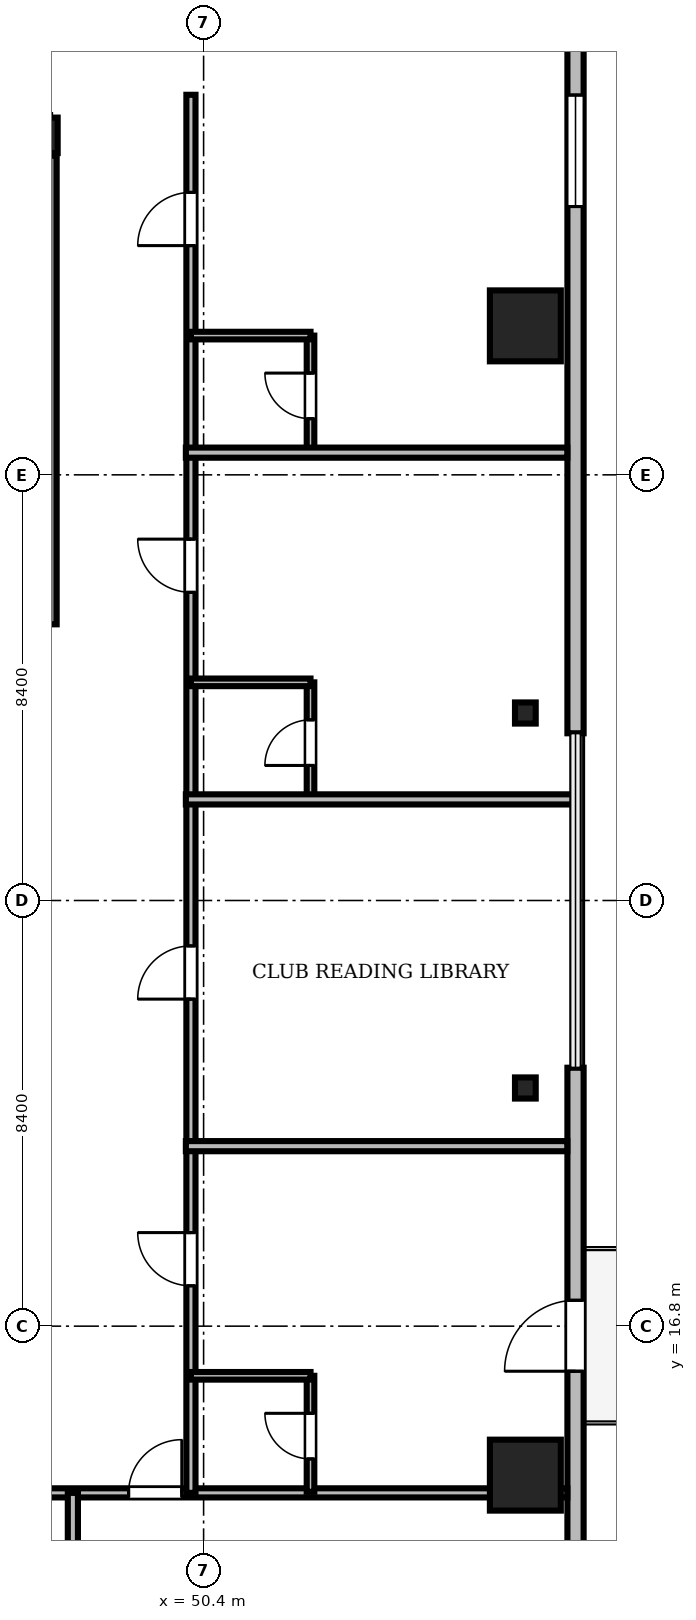
"""IFC4 building model, lengths in metres.
Left out: names, types, materials, properties, quantities, classifications, styles, units other than length and angle.
Written with IfcOpenShell. Run it as: python <this file> out.ifc"""

import sys

from ifc_helpers import new_model, si_unit, direction, frame, frame_2d, origin, origin_2d, place, context, subcontext, project, spatial, rectangle, i_section, extrude, source, transform, mapped, element, fill, save


model = new_model("IFC4")
c1 = context("Model", 3, precision=1e-05, world=origin(), true_north=direction((0.0, 1.0)))
c2 = subcontext(c1, "Body", "Model", "MODEL_VIEW")
j1 = project(units=[si_unit("LENGTHUNIT", "METRE"), si_unit("PLANEANGLEUNIT", "RADIAN")], contexts=[c1])
p1 = place(None, origin())
s1 = spatial("IfcSite", under=j1, at=p1, CompositionType="ELEMENT")
p2 = place(p1, origin())
s2 = spatial("IfcBuilding", under=s1, at=p2, CompositionType="ELEMENT")
p3 = place(p2, frame((0.0, 0.0, 177.2)))
s3 = spatial("IfcBuildingStorey", under=s2, at=p3, CompositionType="ELEMENT", Elevation=177.2)
m1 = source(origin(), c2, "Body", "SweptSolid", [
    extrude(i_section(OverallWidth=0.3, OverallDepth=0.7, WebThickness=0.017, FlangeThickness=0.032, FilletRadius=0.027, at=origin_2d()), origin(), (0.0, 0.0, 1.0), 3.58),
])
p4 = place(p3, frame((47.37, 40.3, 0.0), z_axis=(0.0, 0.0, 1.0), x_axis=(1.0, 0.0, 0.0)))
e1 = element("IfcColumn", 1, at=p4, inside=s3, PredefinedType="COLUMN", context=c2, shape_type="MappedRepresentation", body=[
    mapped(m1, transform((0.0, 0.0, 0.0), scale=1.0)),
])
m2 = source(origin(), c2, "Body", "SweptSolid", [
    extrude(rectangle(XDim=1.4, YDim=1.4, at=origin_2d()), origin(), (0.0, 0.0, 1.0), 3.58),
])
for number, where, z_axis, x_axis in (
    (2, (56.75, 13.86, 0.0), (0.0, 0.0, 1.0), (1.0, 0.0, 0.0)),
    (3, (56.75, 36.54, 0.0), (0.0, 0.0, 1.0), (1.0, 0.0, 0.0)),
):
    element("IfcColumn", number, at=place(p3, frame(where, z_axis=z_axis, x_axis=x_axis)), inside=s3, PredefinedType="COLUMN", context=c2, shape_type="MappedRepresentation", body=[
        mapped(m2, transform((0.0, 0.0, 0.0), scale=1.0)),
    ])
m3 = source(origin(), c2, "Body", "SweptSolid", [
    extrude(i_section(OverallWidth=0.409, OverallDepth=0.417, WebThickness=0.021, FlangeThickness=0.033, FilletRadius=0.015, at=origin_2d()), origin(), (0.0, 0.0, 1.0), 3.58),
])
for number, where, z_axis, x_axis in (
    (4, (56.75, 21.5, 0.0), (0.0, 0.0, 1.0), (1.0, 0.0, 0.0)),
    (5, (56.75, 28.9, 0.0), (0.0, 0.0, 1.0), (1.0, 0.0, 0.0)),
):
    element("IfcColumn", number, at=place(p3, frame(where, z_axis=z_axis, x_axis=x_axis)), inside=s3, PredefinedType="COLUMN", context=c2, shape_type="MappedRepresentation", body=[
        mapped(m3, transform((0.0, 0.0, 0.0), scale=1.0)),
    ])
m4 = source(origin(), c2, "Body", "SweptSolid", [
    extrude(rectangle(XDim=15.6, YDim=0.32, at=frame_2d((7.8, 0.0))), origin(), (0.0, 0.0, 1.0), 3.58),
])
p5 = place(p3, frame((57.74, 6.3, 0.0), z_axis=(0.0, 0.0, 1.0), x_axis=(0.0, 1.0, 0.0)))
e6 = element("IfcWall", 6, at=p5, inside=s3, PredefinedType="SOLIDWALL", context=c2, shape_type="MappedRepresentation", body=[
    mapped(m4, transform((0.0, 0.0, 0.0), scale=1.0)),
])
m5 = source(origin(), c2, "Body", "SweptSolid", [
    extrude(rectangle(XDim=1.4, YDim=2.3, at=frame_2d((0.7, 1.15))), frame((0.0, 0.17, 0.0), z_axis=(0.0, -1.0, 0.0), x_axis=(1.0, 0.0, 0.0)), (0.0, 0.0, 1.0), 0.34),
])
p6 = place(p5, frame((9.61, 0.0, 0.0)))
e7 = element("IfcOpeningElement", 7, at=p6, cuts=e6, PredefinedType="OPENING", context=c2, shape_type="MappedRepresentation", body=[
    mapped(m5, transform((0.0, 0.0, 0.0), scale=1.0)),
])
m6 = source(origin(), c2, "Body", "SweptSolid", [
    extrude(rectangle(XDim=2.2, YDim=2.4, at=frame_2d((1.1, 1.2))), frame((0.0, 0.17, 0.0), z_axis=(0.0, -1.0, 0.0), x_axis=(1.0, 0.0, 0.0)), (0.0, 0.0, 1.0), 0.34),
])
p7 = place(p5, frame((3.005, 0.0, 0.72)))
e8 = element("IfcOpeningElement", 8, at=p7, cuts=e6, PredefinedType="OPENING", context=c2, shape_type="MappedRepresentation", body=[
    mapped(m6, transform((0.0, 0.0, 0.0), scale=1.0)),
])
m7 = source(origin(), c2, "Body", "SweptSolid", [
    extrude(rectangle(XDim=15.6, YDim=0.32, at=frame_2d((7.8, 0.0))), origin(), (0.0, 0.0, 1.0), 3.58),
])
p8 = place(p3, frame((57.74, 28.5, 0.0), z_axis=(0.0, 0.0, 1.0), x_axis=(0.0, 1.0, 0.0)))
e9 = element("IfcWall", 9, at=p8, inside=s3, PredefinedType="SOLIDWALL", context=c2, shape_type="MappedRepresentation", body=[
    mapped(m7, transform((0.0, 0.0, 0.0), scale=1.0)),
])
p9 = place(p8, frame((10.395, 0.0, 0.72)))
e10 = element("IfcOpeningElement", 10, at=p9, cuts=e9, PredefinedType="OPENING", context=c2, shape_type="MappedRepresentation", body=[
    mapped(m6, transform((0.0, 0.0, 0.0), scale=1.0)),
])
m8 = source(origin(), c2, "Body", "SweptSolid", [
    extrude(rectangle(XDim=9.25, YDim=0.25, at=frame_2d((4.625, 0.0))), origin(), (0.0, 0.0, 1.0), 3.6),
])
p10 = place(p3, frame((47.375, 30.65, 0.0), z_axis=(0.0, 0.0, 1.0), x_axis=(0.0, 1.0, 0.0)))
e11 = element("IfcWall", 11, at=p10, inside=s3, PredefinedType="SOLIDWALL", context=c2, shape_type="MappedRepresentation", body=[
    mapped(m8, transform((0.0, 0.0, 0.0), scale=1.0)),
])
m9 = source(origin(), c2, "Body", "SweptSolid", [
    extrude(rectangle(XDim=46.156, YDim=0.18, at=frame_2d((23.078, 0.0))), origin(), (0.0, 0.0, 1.0), 2.822),
])
p11 = place(p3, frame((11.422, 13.51, 0.0), z_axis=(0.0, 0.0, 1.0), x_axis=(1.0, 0.0, 0.0)))
e12 = element("IfcWall", 12, at=p11, inside=s3, PredefinedType="PARTITIONING", context=c2, shape_type="MappedRepresentation", body=[
    mapped(m9, transform((0.0, 0.0, 0.0), scale=1.0)),
])
m10 = source(origin(), c2, "Body", "SweptSolid", [
    extrude(rectangle(XDim=1.05, YDim=2.2, at=frame_2d((0.525, 1.1))), frame((0.0, 0.1, 0.0), z_axis=(0.0, -1.0, 0.0), x_axis=(1.0, 0.0, 0.0)), (0.0, 0.0, 1.0), 0.2),
])
p12 = place(p11, frame((9.758, 0.0, 0.0)))
e13 = element("IfcOpeningElement", 13, at=p12, cuts=e12, PredefinedType="OPENING", context=c2, shape_type="MappedRepresentation", body=[
    mapped(m10, transform((0.0, 0.0, 0.0), scale=1.0)),
])
p13 = place(p11, frame((12.878, 0.0, 0.0)))
e14 = element("IfcOpeningElement", 14, at=p13, cuts=e12, PredefinedType="OPENING", context=c2, shape_type="MappedRepresentation", body=[
    mapped(m10, transform((0.0, 0.0, 0.0), scale=1.0)),
])
p14 = place(p11, frame((16.893, 0.0, 0.0)))
e15 = element("IfcOpeningElement", 15, at=p14, cuts=e12, PredefinedType="OPENING", context=c2, shape_type="MappedRepresentation", body=[
    mapped(m10, transform((0.0, 0.0, 0.0), scale=1.0)),
])
p15 = place(p11, frame((20.344, 0.0, 0.0)))
e16 = element("IfcOpeningElement", 16, at=p15, cuts=e12, PredefinedType="OPENING", context=c2, shape_type="MappedRepresentation", body=[
    mapped(m10, transform((0.0, 0.0, 0.0), scale=1.0)),
])
p16 = place(p11, frame((24.008, 0.0, 0.0)))
e17 = element("IfcOpeningElement", 17, at=p16, cuts=e12, PredefinedType="OPENING", context=c2, shape_type="MappedRepresentation", body=[
    mapped(m10, transform((0.0, 0.0, 0.0), scale=1.0)),
])
p17 = place(p11, frame((28.055, 0.0, 0.0)))
e18 = element("IfcOpeningElement", 18, at=p17, cuts=e12, PredefinedType="OPENING", context=c2, shape_type="MappedRepresentation", body=[
    mapped(m10, transform((0.0, 0.0, 0.0), scale=1.0)),
])
m11 = source(origin(), c2, "Body", "SweptSolid", [
    extrude(rectangle(XDim=0.95, YDim=2.15, at=frame_2d((0.475, 1.075))), frame((0.0, 0.1, 0.0), z_axis=(0.0, -1.0, 0.0), x_axis=(1.0, 0.0, 0.0)), (0.0, 0.0, 1.0), 0.2),
])
p18 = place(p11, frame((34.246, 0.0, 0.0)))
e19 = element("IfcOpeningElement", 19, at=p18, cuts=e12, PredefinedType="OPENING", context=c2, shape_type="MappedRepresentation", body=[
    mapped(m11, transform((0.0, 0.0, 0.0), scale=1.0)),
])
p19 = place(p11, frame((37.498, 0.0, 0.0)))
e20 = element("IfcOpeningElement", 20, at=p19, cuts=e12, PredefinedType="OPENING", context=c2, shape_type="MappedRepresentation", body=[
    mapped(m10, transform((0.0, 0.0, 0.0), scale=1.0)),
])
m12 = source(origin(), c2, "Body", "SweptSolid", [
    extrude(rectangle(XDim=27.59, YDim=0.18, at=frame_2d((13.795, 0.0))), origin(), (0.0, 0.0, 1.0), 3.022),
])
p20 = place(p3, frame((50.15, 13.51, 0.0), z_axis=(0.0, 0.0, 1.0), x_axis=(0.0, 1.0, 0.0)))
e21 = element("IfcWall", 21, at=p20, inside=s3, PredefinedType="PARTITIONING", context=c2, shape_type="MappedRepresentation", body=[
    mapped(m12, transform((0.0, 0.0, 0.0), scale=1.0)),
])
p21 = place(p20, frame((4.086, 0.0, 0.0)))
e22 = element("IfcOpeningElement", 22, at=p21, cuts=e21, PredefinedType="OPENING", context=c2, shape_type="MappedRepresentation", body=[
    mapped(m10, transform((0.0, 0.0, 0.0), scale=1.0)),
])
p22 = place(p20, frame((9.744, 0.0, 0.0)))
e23 = element("IfcOpeningElement", 23, at=p22, cuts=e21, PredefinedType="OPENING", context=c2, shape_type="MappedRepresentation", body=[
    mapped(m10, transform((0.0, 0.0, 0.0), scale=1.0)),
])
p23 = place(p20, frame((17.771, 0.0, 0.0)))
e24 = element("IfcOpeningElement", 24, at=p23, cuts=e21, PredefinedType="OPENING", context=c2, shape_type="MappedRepresentation", body=[
    mapped(m10, transform((0.0, 0.0, 0.0), scale=1.0)),
])
p24 = place(p20, frame((24.614, 0.0, 0.0)))
e25 = element("IfcOpeningElement", 25, at=p24, cuts=e21, PredefinedType="OPENING", context=c2, shape_type="MappedRepresentation", body=[
    mapped(m10, transform((0.0, 0.0, 0.0), scale=1.0)),
])
m13 = source(origin(), c2, "Body", "SweptSolid", [
    extrude(rectangle(XDim=2.29, YDim=0.15, at=frame_2d((1.145, 0.0))), origin(), (0.0, 0.0, 1.0), 3.022),
])
p25 = place(p3, frame((52.51, 13.53, 0.0), z_axis=(0.0, 0.0, 1.0), x_axis=(0.0, 1.0, 0.0)))
e26 = element("IfcWall", 26, at=p25, inside=s3, PredefinedType="PARTITIONING", context=c2, shape_type="MappedRepresentation", body=[
    mapped(m13, transform((0.0, 0.0, 0.0), scale=1.0)),
])
m14 = source(origin(), c2, "Body", "SweptSolid", [
    extrude(rectangle(XDim=0.9, YDim=2.1, at=frame_2d((0.45, 1.05))), frame((0.0, 0.085, 0.0), z_axis=(0.0, -1.0, 0.0), x_axis=(1.0, 0.0, 0.0)), (0.0, 0.0, 1.0), 0.17),
])
p26 = place(p25, frame((0.65, 0.0, 0.0)))
e27 = element("IfcOpeningElement", 27, at=p26, cuts=e26, PredefinedType="OPENING", context=c2, shape_type="MappedRepresentation", body=[
    mapped(m14, transform((0.0, 0.0, 0.0), scale=1.0)),
])
m15 = source(origin(), c2, "Body", "SweptSolid", [
    extrude(rectangle(XDim=2.29, YDim=0.15, at=frame_2d((1.145, 0.0))), origin(), (0.0, 0.0, 1.0), 3.022),
])
p27 = place(p3, frame((52.51, 27.215, 0.0), z_axis=(0.0, 0.0, 1.0), x_axis=(0.0, 1.0, 0.0)))
e28 = element("IfcWall", 28, at=p27, inside=s3, PredefinedType="PARTITIONING", context=c2, shape_type="MappedRepresentation", body=[
    mapped(m15, transform((0.0, 0.0, 0.0), scale=1.0)),
])
p28 = place(p27, frame((0.65, 0.0, 0.0)))
e29 = element("IfcOpeningElement", 29, at=p28, cuts=e28, PredefinedType="OPENING", context=c2, shape_type="MappedRepresentation", body=[
    mapped(m14, transform((0.0, 0.0, 0.0), scale=1.0)),
])
m16 = source(origin(), c2, "Body", "SweptSolid", [
    extrude(rectangle(XDim=2.29, YDim=0.15, at=frame_2d((1.145, 0.0))), origin(), (0.0, 0.0, 1.0), 3.58),
])
p29 = place(p3, frame((52.51, 34.058, 0.0), z_axis=(0.0, 0.0, 1.0), x_axis=(0.0, 1.0, 0.0)))
e30 = element("IfcWall", 30, at=p29, inside=s3, PredefinedType="PARTITIONING", context=c2, shape_type="MappedRepresentation", body=[
    mapped(m16, transform((0.0, 0.0, 0.0), scale=1.0)),
])
p30 = place(p29, frame((0.65, 0.0, 0.0)))
e31 = element("IfcOpeningElement", 31, at=p30, cuts=e30, PredefinedType="OPENING", context=c2, shape_type="MappedRepresentation", body=[
    mapped(m14, transform((0.0, 0.0, 0.0), scale=1.0)),
])
m17 = source(origin(), c2, "Body", "SweptSolid", [
    extrude(rectangle(XDim=11.388, YDim=0.2, at=frame_2d((5.694, 0.0))), origin(), (0.0, 0.0, 1.0), 2.822),
])
p31 = place(p3, frame((47.82, 2.122, 0.0), z_axis=(0.0, 0.0, 1.0), x_axis=(0.0, 1.0, 0.0)))
e32 = element("IfcWall", 32, at=p31, inside=s3, PredefinedType="PARTITIONING", context=c2, shape_type="MappedRepresentation", body=[
    mapped(m17, transform((0.0, 0.0, 0.0), scale=1.0)),
])
m18 = source(origin(), c2, "Body", "SweptSolid", [
    extrude(rectangle(XDim=7.528, YDim=0.2, at=frame_2d((3.764, 0.0))), origin(), (0.0, 0.0, 1.0), 2.822),
])
p32 = place(p3, frame((50.05, 20.352, 0.0), z_axis=(0.0, 0.0, 1.0), x_axis=(1.0, 0.0, 0.0)))
e33 = element("IfcWall", 33, at=p32, inside=s3, PredefinedType="PARTITIONING", context=c2, shape_type="MappedRepresentation", body=[
    mapped(m18, transform((0.0, 0.0, 0.0), scale=1.0)),
])
m19 = source(origin(), c2, "Body", "SweptSolid", [
    extrude(rectangle(XDim=7.72, YDim=0.2, at=frame_2d((3.86, 0.0))), origin(), (0.0, 0.0, 1.0), 2.822),
])
p33 = place(p3, frame((50.05, 27.195, 0.0), z_axis=(0.0, 0.0, 1.0), x_axis=(1.0, 0.0, 0.0)))
e34 = element("IfcWall", 34, at=p33, inside=s3, PredefinedType="PARTITIONING", context=c2, shape_type="MappedRepresentation", body=[
    mapped(m19, transform((0.0, 0.0, 0.0), scale=1.0)),
])
p34 = place(p3, frame((50.05, 34.038, 0.0), z_axis=(0.0, 0.0, 1.0), x_axis=(1.0, 0.0, 0.0)))
e35 = element("IfcWall", 35, at=p34, inside=s3, PredefinedType="PARTITIONING", context=c2, shape_type="MappedRepresentation", body=[
    mapped(m18, transform((0.0, 0.0, 0.0), scale=1.0)),
])
m20 = source(origin(), c2, "Body", "SweptSolid", [
    extrude(rectangle(XDim=2.36, YDim=0.15, at=frame_2d((1.18, 0.0))), origin(), (0.0, 0.0, 1.0), 3.58),
])
for number, where, z_axis, x_axis in (
    (36, (50.15, 15.82, 0.0), (0.0, 0.0, 1.0), (1.0, 0.0, 0.0)),
    (37, (50.15, 29.505, 0.0), (0.0, 0.0, 1.0), (1.0, 0.0, 0.0)),
    (38, (50.15, 36.348, 0.0), (0.0, 0.0, 1.0), (1.0, 0.0, 0.0)),
):
    element("IfcWall", number, at=place(p3, frame(where, z_axis=z_axis, x_axis=x_axis)), inside=s3, PredefinedType="PARTITIONING", context=c2, shape_type="MappedRepresentation", body=[
        mapped(m20, transform((0.0, 0.0, 0.0), scale=1.0)),
    ])
m21 = source(origin(), c2, "Body", "SweptSolid", [
    extrude(rectangle(XDim=1.4, YDim=2.3, at=frame_2d((0.7, 1.15))), frame((0.0, 0.025, 0.0), z_axis=(0.0, -1.0, 0.0), x_axis=(1.0, 0.0, 0.0)), (0.0, 0.0, 1.0), 0.05),
])
p35 = place(p6, frame((1.4, 0.0, 0.0), z_axis=(0.0, 0.0, 1.0), x_axis=(-1.0, 0.0, 0.0)))
e39 = element("IfcDoor", 39, at=p35, inside=s3, OperationType="DOUBLE_DOOR_SLIDING", PredefinedType="DOOR", context=c2, shape_type="MappedRepresentation", body=[
    mapped(m21, transform((0.0, 0.0, 0.0), scale=1.0)),
])
fill(e7, e39)
m22 = source(origin(), c2, "Body", "SweptSolid", [
    extrude(rectangle(XDim=2.2, YDim=2.4, at=frame_2d((1.1, 1.2))), frame((0.0, 0.03, 0.0), z_axis=(0.0, -1.0, 0.0), x_axis=(1.0, 0.0, 0.0)), (0.0, 0.0, 1.0), 0.06),
])
p36 = place(p9, origin())
e40 = element("IfcWindow", 40, at=p36, inside=s3, PartitioningType="SINGLE_PANEL", PredefinedType="WINDOW", context=c2, shape_type="MappedRepresentation", body=[
    mapped(m22, transform((0.0, 0.0, 0.0), scale=1.0)),
])
fill(e10, e40)
m23 = source(origin(), c2, "Body", "SweptSolid", [
    extrude(rectangle(XDim=1.05, YDim=2.2, at=frame_2d((0.525, 1.1))), frame((0.0, 0.025, 0.0), z_axis=(0.0, -1.0, 0.0), x_axis=(1.0, 0.0, 0.0)), (0.0, 0.0, 1.0), 0.05),
])
p37 = place(p19, origin())
e41 = element("IfcDoor", 41, at=p37, inside=s3, OperationType="SINGLE_SWING_RIGHT", PredefinedType="DOOR", context=c2, shape_type="MappedRepresentation", body=[
    mapped(m23, transform((0.0, 0.0, 0.0), scale=1.0)),
])
fill(e20, e41)
p38 = place(p21, origin())
e42 = element("IfcDoor", 42, at=p38, inside=s3, OperationType="SINGLE_SWING_RIGHT", PredefinedType="DOOR", context=c2, shape_type="MappedRepresentation", body=[
    mapped(m23, transform((0.0, 0.0, 0.0), scale=1.0)),
])
fill(e22, e42)
p39 = place(p22, origin())
e43 = element("IfcDoor", 43, at=p39, inside=s3, OperationType="SINGLE_SWING_LEFT", PredefinedType="DOOR", context=c2, shape_type="MappedRepresentation", body=[
    mapped(m23, transform((0.0, 0.0, 0.0), scale=1.0)),
])
fill(e23, e43)
p40 = place(p23, origin())
e44 = element("IfcDoor", 44, at=p40, inside=s3, OperationType="SINGLE_SWING_RIGHT", PredefinedType="DOOR", context=c2, shape_type="MappedRepresentation", body=[
    mapped(m23, transform((0.0, 0.0, 0.0), scale=1.0)),
])
fill(e24, e44)
p41 = place(p24, origin())
e45 = element("IfcDoor", 45, at=p41, inside=s3, OperationType="SINGLE_SWING_LEFT", PredefinedType="DOOR", context=c2, shape_type="MappedRepresentation", body=[
    mapped(m23, transform((0.0, 0.0, 0.0), scale=1.0)),
])
fill(e25, e45)
m24 = source(origin(), c2, "Body", "SweptSolid", [
    extrude(rectangle(XDim=0.9, YDim=2.1, at=frame_2d((0.45, 1.05))), frame((0.0, 0.025, 0.0), z_axis=(0.0, -1.0, 0.0), x_axis=(1.0, 0.0, 0.0)), (0.0, 0.0, 1.0), 0.05),
])
p42 = place(p26, origin())
e46 = element("IfcDoor", 46, at=p42, inside=s3, OperationType="SINGLE_SWING_RIGHT", PredefinedType="DOOR", context=c2, shape_type="MappedRepresentation", body=[
    mapped(m24, transform((0.0, 0.0, 0.0), scale=1.0)),
])
fill(e27, e46)
p43 = place(p28, origin())
e47 = element("IfcDoor", 47, at=p43, inside=s3, OperationType="SINGLE_SWING_LEFT", PredefinedType="DOOR", context=c2, shape_type="MappedRepresentation", body=[
    mapped(m24, transform((0.0, 0.0, 0.0), scale=1.0)),
])
fill(e29, e47)
p44 = place(p30, origin())
e48 = element("IfcDoor", 48, at=p44, inside=s3, OperationType="SINGLE_SWING_RIGHT", PredefinedType="DOOR", context=c2, shape_type="MappedRepresentation", body=[
    mapped(m24, transform((0.0, 0.0, 0.0), scale=1.0)),
])
fill(e31, e48)
save(model, sys.argv[1])
